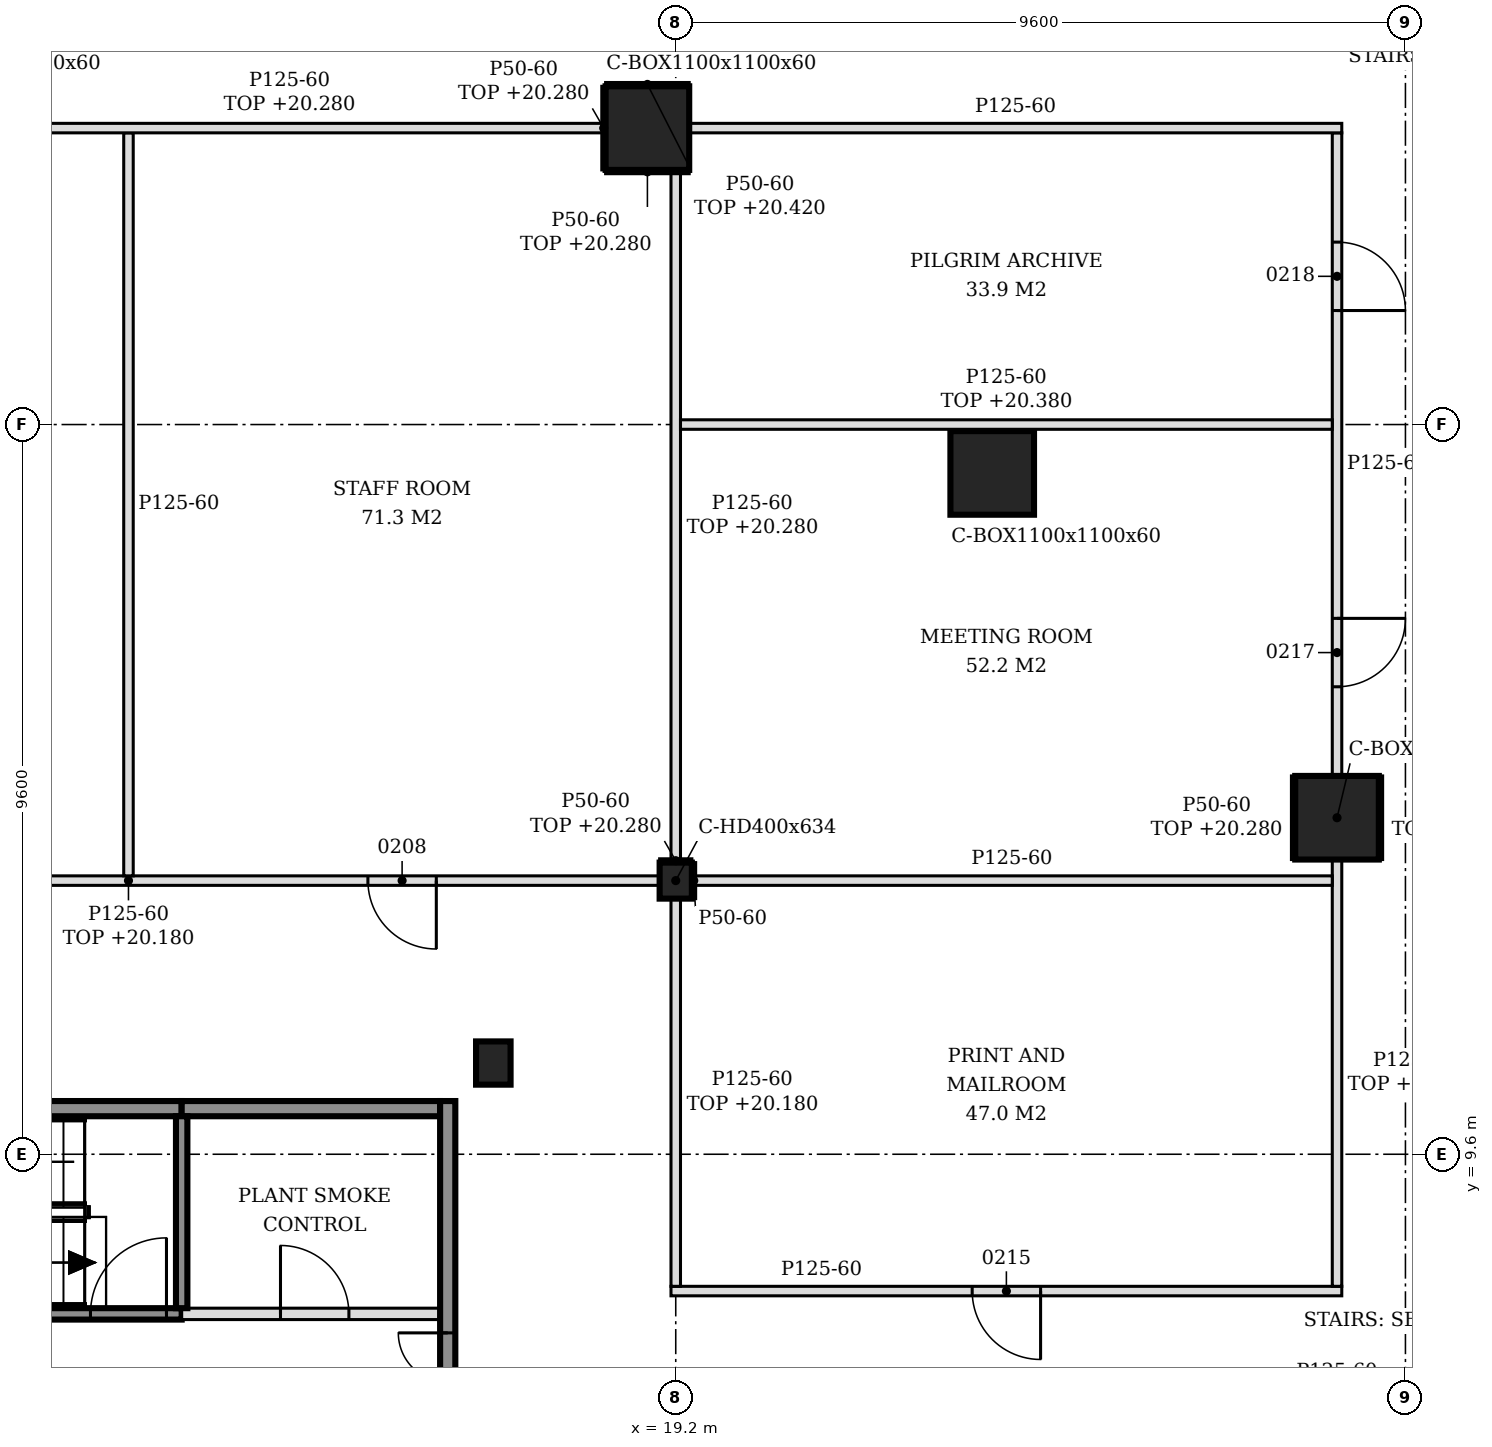
"""IFC4 building model, lengths in metres.
Left out: names, types, materials, properties, quantities, classifications, styles, units other than length and angle.
Written with IfcOpenShell. Run it as: python <this file> out.ifc"""

import sys

from ifc_helpers import new_model, si_unit, direction, frame, frame_2d, origin, origin_2d, place, context, subcontext, project, spatial, polyline, rectangle, hollow_rectangle, i_section, outline, extrude, element, fill, save


model = new_model("IFC4")
c1 = context("Model", 3, precision=1e-05, world=origin(), true_north=direction((0.0, 1.0)))
c2 = subcontext(c1, "Body", "Model", "MODEL_VIEW")
j1 = project(units=[si_unit("LENGTHUNIT", "METRE"), si_unit("PLANEANGLEUNIT", "RADIAN")], contexts=[c1])
p1 = place(None, origin())
s1 = spatial("IfcSite", under=j1, at=p1, CompositionType="ELEMENT")
p2 = place(p1, origin())
s2 = spatial("IfcBuilding", under=s1, at=p2, CompositionType="ELEMENT")
p3 = place(p2, frame((0.0, 0.0, 15.0)))
s3 = spatial("IfcBuildingStorey", under=s2, at=p3, CompositionType="ELEMENT", Elevation=15.0)
for number, where, z_axis, x_axis in (
    (1, (27.9, 14.027, -0.2), (0.0, 0.0, 1.0), (1.0, 0.0, 0.0)),
    (2, (23.364, 18.564, -0.2), (0.0, 0.0, 1.0), (1.0, 0.0, 0.0)),
    (3, (18.827, 23.1, -0.2), (0.0, 0.0, 1.0), (1.0, 0.0, 0.0)),
):
    element("IfcColumn", number, at=place(p3, frame(where, z_axis=z_axis, x_axis=x_axis)), inside=s3, PredefinedType="COLUMN", context=c2, shape_type="SweptSolid", body=[
        extrude(hollow_rectangle(XDim=1.1, YDim=1.1, WallThickness=0.06, at=origin_2d()), origin(), (0.0, 0.0, 1.0), 6.0),
    ])
p4 = place(p3, frame((19.2, 13.2, -0.2), z_axis=(0.0, 0.0, 1.0), x_axis=(1.0, 0.0, 0.0)))
e4 = element("IfcColumn", 4, at=p4, inside=s3, PredefinedType="COLUMN", context=c2, shape_type="SweptSolid", body=[
    extrude(i_section(OverallWidth=0.424, OverallDepth=0.474, WebThickness=0.048, FlangeThickness=0.077, FilletRadius=0.015, at=origin_2d()), origin(), (0.0, 0.0, 1.0), 6.0),
])
p5 = place(p3, frame((16.8, 10.8, -0.2), z_axis=(0.0, 0.0, 1.0), x_axis=(1.0, 0.0, 0.0)))
e5 = element("IfcColumn", 5, at=p5, inside=s3, PredefinedType="COLUMN", context=c2, shape_type="SweptSolid", body=[
    extrude(i_section(OverallWidth=0.454, OverallDepth=0.569, WebThickness=0.078, FlangeThickness=0.125, FilletRadius=0.015, at=origin_2d()), origin(), (0.0, 0.0, 1.0), 6.0),
])
p6 = place(p3, frame((6.275, 7.5, 0.0), z_axis=(0.0, 0.0, 1.0), x_axis=(1.0, 0.0, 0.0)))
e6 = element("IfcWall", 6, at=p6, inside=s3, PredefinedType="SOLIDWALL", context=c2, shape_type="SweptSolid", body=[
    extrude(rectangle(XDim=6.425, YDim=0.15, at=frame_2d((3.212, 0.0))), origin(), (0.0, 0.0, 1.0), 5.8),
])
p7 = place(p6, frame((5.225, 0.0, 0.0)))
e7 = element("IfcOpeningElement", 7, at=p7, cuts=e6, PredefinedType="OPENING", context=c2, shape_type="SweptSolid", body=[
    extrude(rectangle(XDim=1.0, YDim=2.1, at=frame_2d((0.5, 1.05))), frame((0.0, 0.085, 0.0), z_axis=(0.0, -1.0, 0.0), x_axis=(1.0, 0.0, 0.0)), (0.0, 0.0, 1.0), 0.17),
])
p8 = place(p3, frame((12.7, 7.5, 0.0), z_axis=(0.0, 0.0, 1.0), x_axis=(1.0, 0.0, 0.0)))
e8 = element("IfcWall", 8, at=p8, inside=s3, PredefinedType="SOLIDWALL", context=c2, shape_type="SweptSolid", body=[
    extrude(rectangle(XDim=3.4, YDim=0.15, at=frame_2d((1.7, 0.0))), origin(), (0.0, 0.0, 1.0), 5.8),
])
p9 = place(p8, frame((1.3, 0.0, 0.0)))
e9 = element("IfcOpeningElement", 9, at=p9, cuts=e8, PredefinedType="OPENING", context=c2, shape_type="SweptSolid", body=[
    extrude(rectangle(XDim=0.9, YDim=2.1, at=frame_2d((0.45, 1.05))), frame((0.0, 0.085, 0.0), z_axis=(0.0, -1.0, 0.0), x_axis=(1.0, 0.0, 0.0)), (0.0, 0.0, 1.0), 0.17),
])
p10 = place(p3, frame((6.2, 10.2, 0.0), z_axis=(0.0, 0.0, 1.0), x_axis=(1.0, 0.0, 0.0)))
e10 = element("IfcWall", 10, at=p10, inside=s3, PredefinedType="SOLIDWALL", context=c2, shape_type="SweptSolid", body=[
    extrude(rectangle(XDim=6.5, YDim=0.2, at=frame_2d((3.25, 0.0))), origin(), (0.0, 0.0, 1.0), 5.8),
])
p11 = place(p3, frame((12.7, 10.2, 0.0), z_axis=(0.0, 0.0, 1.0), x_axis=(1.0, 0.0, 0.0)))
e11 = element("IfcWall", 11, at=p11, inside=s3, PredefinedType="SOLIDWALL", context=c2, shape_type="SweptSolid", body=[
    extrude(rectangle(XDim=3.4, YDim=0.2, at=frame_2d((1.7, 0.0))), origin(), (0.0, 0.0, 1.0), 5.8),
])
p12 = place(p3, frame((12.7, 7.575, 0.0), z_axis=(0.0, 0.0, 1.0), x_axis=(0.0, 1.0, 0.0)))
e12 = element("IfcWall", 12, at=p12, inside=s3, PredefinedType="SOLIDWALL", context=c2, shape_type="SweptSolid", body=[
    extrude(rectangle(XDim=2.525, YDim=0.15, at=frame_2d((1.263, 0.0))), origin(), (0.0, 0.0, 1.0), 5.8),
])
p13 = place(p3, frame((16.2, -5.5, 0.0), z_axis=(0.0, 0.0, 1.0), x_axis=(0.0, 1.0, 0.0)))
e13 = element("IfcWall", 13, at=p13, inside=s3, PredefinedType="SOLIDWALL", context=c2, shape_type="SweptSolid", body=[
    extrude(rectangle(XDim=15.8, YDim=0.2, at=frame_2d((7.9, 0.0))), origin(), (0.0, 0.0, 1.0), 5.8),
])
p14 = place(p13, frame((3.05, 0.0, 0.0)))
e14 = element("IfcOpeningElement", 14, at=p14, cuts=e13, PredefinedType="OPENING", context=c2, shape_type="SweptSolid", body=[
    extrude(rectangle(XDim=1.3, YDim=2.1, at=frame_2d((0.65, 1.05))), frame((0.0, 0.11, 0.0), z_axis=(0.0, -1.0, 0.0), x_axis=(1.0, 0.0, 0.0)), (0.0, 0.0, 1.0), 0.22),
])
p15 = place(p13, frame((11.45, 0.0, 0.0)))
e15 = element("IfcOpeningElement", 15, at=p15, cuts=e13, PredefinedType="OPENING", context=c2, shape_type="SweptSolid", body=[
    extrude(rectangle(XDim=1.3, YDim=2.1, at=frame_2d((0.65, 1.05))), frame((0.0, 0.11, 0.0), z_axis=(0.0, -1.0, 0.0), x_axis=(1.0, 0.0, 0.0)), (0.0, 0.0, 1.0), 0.22),
])
p16 = place(p3, frame((19.137, 7.8, 0.0), z_axis=(0.0, 0.0, 1.0), x_axis=(1.0, 0.0, 0.0)))
e16 = element("IfcWall", 16, at=p16, inside=s3, PredefinedType="PARTITIONING", context=c2, shape_type="SweptSolid", body=[
    extrude(outline(polyline([(0.0, 0.0), (8.825, 0.0), (8.825, 5.28), (8.613, 5.28), (8.611, 5.8), (4.962, 5.8), (4.96, 5.28), (4.762, 5.28), (4.76, 5.8), (0.212, 5.8), (0.21, 5.18), (0.0, 5.18), (0.0, 0.0)])), frame((0.0, 0.062, 0.0), z_axis=(0.0, -1.0, 0.0), x_axis=(1.0, 0.0, 0.0)), (0.0, 0.0, 1.0), 0.125),
])
p17 = place(p16, frame((3.962, 0.0, 0.0)))
e17 = element("IfcOpeningElement", 17, at=p17, cuts=e16, PredefinedType="OPENING", context=c2, shape_type="SweptSolid", body=[
    extrude(rectangle(XDim=0.9, YDim=2.1, at=frame_2d((0.45, 1.05))), frame((0.0, 0.073, 0.0), z_axis=(0.0, -1.0, 0.0), x_axis=(1.0, 0.0, 0.0)), (0.0, 0.0, 1.0), 0.145),
])
p18 = place(p3, frame((19.2, 7.863, 0.0), z_axis=(0.0, 0.0, 1.0), x_axis=(0.0, 1.0, 0.0)))
e18 = element("IfcWall", 18, at=p18, inside=s3, PredefinedType="PARTITIONING", context=c2, shape_type="SweptSolid", body=[
    extrude(rectangle(XDim=5.1, YDim=0.125, at=frame_2d((2.55, 0.0))), origin(), (0.0, 0.0, 1.0), 5.18),
])
p19 = place(p3, frame((27.9, 7.863, 0.0), z_axis=(0.0, 0.0, 1.0), x_axis=(0.0, 1.0, 0.0)))
e19 = element("IfcWall", 19, at=p19, inside=s3, PredefinedType="PARTITIONING", context=c2, shape_type="SweptSolid", body=[
    extrude(rectangle(XDim=5.615, YDim=0.125, at=frame_2d((2.807, 0.0))), origin(), (0.0, 0.0, 1.0), 5.28),
])
p20 = place(p3, frame((7.412, 13.2, 0.0), z_axis=(0.0, 0.0, 1.0), x_axis=(1.0, 0.0, 0.0)))
e20 = element("IfcWall", 20, at=p20, inside=s3, PredefinedType="PARTITIONING", context=c2, shape_type="SweptSolid", body=[
    extrude(rectangle(XDim=11.576, YDim=0.125, at=frame_2d((5.788, 0.0))), origin(), (0.0, 0.0, 1.0), 5.18),
])
p21 = place(p20, frame((0.538, 0.0, 0.0)))
e21 = element("IfcOpeningElement", 21, at=p21, cuts=e20, PredefinedType="OPENING", context=c2, shape_type="SweptSolid", body=[
    extrude(rectangle(XDim=0.9, YDim=2.1, at=frame_2d((0.45, 1.05))), frame((0.0, 0.073, 0.0), z_axis=(0.0, -1.0, 0.0), x_axis=(1.0, 0.0, 0.0)), (0.0, 0.0, 1.0), 0.145),
])
p22 = place(p20, frame((7.738, 0.0, 0.0)))
e22 = element("IfcOpeningElement", 22, at=p22, cuts=e20, PredefinedType="OPENING", context=c2, shape_type="SweptSolid", body=[
    extrude(rectangle(XDim=0.9, YDim=2.1, at=frame_2d((0.45, 1.05))), frame((0.0, 0.073, 0.0), z_axis=(0.0, -1.0, 0.0), x_axis=(1.0, 0.0, 0.0)), (0.0, 0.0, 1.0), 0.145),
])
p23 = place(p3, frame((19.412, 13.2, 0.0), z_axis=(0.0, 0.0, 1.0), x_axis=(1.0, 0.0, 0.0)))
e23 = element("IfcWall", 23, at=p23, inside=s3, PredefinedType="PARTITIONING", context=c2, shape_type="SweptSolid", body=[
    extrude(outline(polyline([(0.0, 0.0), (8.425, 0.0), (8.426, 5.28), (8.338, 5.28), (8.336, 5.8), (4.678, 5.8), (4.676, 5.38), (4.498, 5.38), (4.496, 5.8), (0.0, 5.8), (0.0, 0.0)])), frame((0.0, 0.062, 0.0), z_axis=(0.0, -1.0, 0.0), x_axis=(1.0, 0.0, 0.0)), (0.0, 0.0, 1.0), 0.125),
])
p24 = place(p3, frame((12.0, 13.262, 0.0), z_axis=(0.0, 0.0, 1.0), x_axis=(0.0, 1.0, 0.0)))
e24 = element("IfcWall", 24, at=p24, inside=s3, PredefinedType="PARTITIONING", context=c2, shape_type="SweptSolid", body=[
    extrude(outline(polyline([(0.0, 0.0), (9.775, 0.0), (9.775, 5.28), (9.688, 5.28), (9.686, 5.8), (0.087, 5.8), (0.085, 5.18), (0.0, 5.18), (0.0, 0.0)])), frame((0.0, 0.062, 0.0), z_axis=(0.0, -1.0, 0.0), x_axis=(1.0, 0.0, 0.0)), (0.0, 0.0, 1.0), 0.125),
])
p25 = place(p3, frame((19.2, 13.437, 0.0), z_axis=(0.0, 0.0, 1.0), x_axis=(0.0, 1.0, 0.0)))
e25 = element("IfcWall", 25, at=p25, inside=s3, PredefinedType="PARTITIONING", context=c2, shape_type="SweptSolid", body=[
    extrude(rectangle(XDim=9.113, YDim=0.125, at=frame_2d((4.557, 0.0))), origin(), (0.0, 0.0, 1.0), 5.28),
])
p26 = place(p3, frame((27.9, 14.577, 0.0), z_axis=(0.0, 0.0, 1.0), x_axis=(0.0, 1.0, 0.0)))
e26 = element("IfcWall", 26, at=p26, inside=s3, PredefinedType="PARTITIONING", context=c2, shape_type="SweptSolid", body=[
    extrude(outline(polyline([(0.0, 0.0), (8.46, 0.0), (8.46, 5.8), (4.713, 5.8), (4.711, 5.38), (4.533, 5.38), (4.531, 5.8), (0.0, 5.8), (0.0, 0.0)])), frame((0.0, 0.062, 0.0), z_axis=(0.0, -1.0, 0.0), x_axis=(1.0, 0.0, 0.0)), (0.0, 0.0, 1.0), 0.125),
])
p27 = place(p26, frame((1.173, 0.0, 0.0)))
e27 = element("IfcOpeningElement", 27, at=p27, cuts=e26, PredefinedType="OPENING", context=c2, shape_type="SweptSolid", body=[
    extrude(rectangle(XDim=0.9, YDim=2.1, at=frame_2d((0.45, 1.05))), frame((0.0, 0.073, 0.0), z_axis=(0.0, -1.0, 0.0), x_axis=(1.0, 0.0, 0.0)), (0.0, 0.0, 1.0), 0.145),
])
p28 = place(p26, frame((6.123, 0.0, 0.0)))
e28 = element("IfcOpeningElement", 28, at=p28, cuts=e26, PredefinedType="OPENING", context=c2, shape_type="SweptSolid", body=[
    extrude(rectangle(XDim=0.9, YDim=2.1, at=frame_2d((0.45, 1.05))), frame((0.0, 0.073, 0.0), z_axis=(0.0, -1.0, 0.0), x_axis=(1.0, 0.0, 0.0)), (0.0, 0.0, 1.0), 0.145),
])
p29 = place(p3, frame((19.262, 19.2, 0.0), z_axis=(0.0, 0.0, 1.0), x_axis=(1.0, 0.0, 0.0)))
e29 = element("IfcWall", 29, at=p29, inside=s3, PredefinedType="PARTITIONING", context=c2, shape_type="SweptSolid", body=[
    extrude(outline(polyline([(0.0, 0.0), (8.575, 0.0), (8.575, 5.38), (3.739, 5.38), (3.737, 5.28), (3.19, 5.28), (3.188, 5.38), (0.038, 5.38), (0.035, 5.28), (0.0, 5.28), (0.0, 0.0)])), frame((0.0, 0.062, 0.0), z_axis=(0.0, -1.0, 0.0), x_axis=(1.0, 0.0, 0.0)), (0.0, 0.0, 1.0), 0.125),
])
p30 = place(p3, frame((9.964, 23.1, 0.0), z_axis=(0.0, 0.0, 1.0), x_axis=(1.0, 0.0, 0.0)))
e30 = element("IfcWall", 30, at=p30, inside=s3, PredefinedType="PARTITIONING", context=c2, shape_type="SweptSolid", body=[
    extrude(rectangle(XDim=8.313, YDim=0.125, at=frame_2d((4.157, 0.0))), origin(), (0.0, 0.0, 1.0), 5.28),
])
p31 = place(p3, frame((19.377, 23.1, 0.0), z_axis=(0.0, 0.0, 1.0), x_axis=(1.0, 0.0, 0.0)))
e31 = element("IfcWall", 31, at=p31, inside=s3, PredefinedType="PARTITIONING", context=c2, shape_type="SweptSolid", body=[
    extrude(rectangle(XDim=8.585, YDim=0.125, at=frame_2d((4.292, 0.0))), origin(), (0.0, 0.0, 1.0), 5.8),
])
p32 = place(p3, frame((19.437, 12.963, 0.0), z_axis=(0.0, 0.0, 1.0), x_axis=(0.0, 1.0, 0.0)))
e32 = element("IfcWall", 32, at=p32, inside=s3, PredefinedType="PARTITIONING", context=c2, shape_type="SweptSolid", body=[
    extrude(rectangle(XDim=0.474, YDim=0.05, at=frame_2d((0.237, 0.0))), origin(), (0.0, 0.0, 1.0), 5.8),
])
for number, where, z_axis, x_axis in (
    (33, (27.325, 13.477, 0.0), (0.0, 0.0, 1.0), (0.0, 1.0, 0.0)),
    (34, (28.475, 13.477, 0.0), (0.0, 0.0, 1.0), (0.0, 1.0, 0.0)),
):
    element("IfcWall", number, at=place(p3, frame(where, z_axis=z_axis, x_axis=x_axis)), inside=s3, PredefinedType="PARTITIONING", context=c2, shape_type="SweptSolid", body=[
        extrude(rectangle(XDim=1.1, YDim=0.05, at=frame_2d((0.55, 0.0))), origin(), (0.0, 0.0, 1.0), 5.28),
    ])
p33 = place(p3, frame((18.988, 13.462, 0.0), z_axis=(0.0, 0.0, 1.0), x_axis=(1.0, 0.0, 0.0)))
e35 = element("IfcWall", 35, at=p33, inside=s3, PredefinedType="PARTITIONING", context=c2, shape_type="SweptSolid", body=[
    extrude(rectangle(XDim=0.424, YDim=0.05, at=frame_2d((0.212, 0.0))), origin(), (0.0, 0.0, 1.0), 5.28),
])
p34 = place(p3, frame((18.252, 22.55, 0.0), z_axis=(0.0, 0.0, 1.0), x_axis=(0.0, 1.0, 0.0)))
e36 = element("IfcWall", 36, at=p34, inside=s3, PredefinedType="PARTITIONING", context=c2, shape_type="SweptSolid", body=[
    extrude(rectangle(XDim=1.1, YDim=0.05, at=frame_2d((0.55, 0.0))), origin(), (0.0, 0.0, 1.0), 5.28),
])
p35 = place(p3, frame((18.277, 22.525, 0.0), z_axis=(0.0, 0.0, 1.0), x_axis=(1.0, 0.0, 0.0)))
e37 = element("IfcWall", 37, at=p35, inside=s3, PredefinedType="PARTITIONING", context=c2, shape_type="SweptSolid", body=[
    extrude(rectangle(XDim=1.1, YDim=0.05, at=frame_2d((0.55, 0.0))), origin(), (0.0, 0.0, 1.0), 5.28),
])
p36 = place(p3, frame((18.277, 23.675, 0.0), z_axis=(0.0, 0.0, 1.0), x_axis=(1.0, 0.0, 0.0)))
e38 = element("IfcWall", 38, at=p36, inside=s3, PredefinedType="PARTITIONING", context=c2, shape_type="SweptSolid", body=[
    extrude(rectangle(XDim=1.1, YDim=0.05, at=frame_2d((0.55, 0.0))), origin(), (0.0, 0.0, 1.0), 5.42),
])
p37 = place(p7, origin())
e39 = element("IfcDoor", 39, at=p37, inside=s3, OperationType="SINGLE_SWING_RIGHT", PredefinedType="DOOR", context=c2, shape_type="SweptSolid", body=[
    extrude(rectangle(XDim=1.0, YDim=2.1, at=frame_2d((0.5, 1.05))), frame((0.0, 0.025, 0.0), z_axis=(0.0, -1.0, 0.0), x_axis=(1.0, 0.0, 0.0)), (0.0, 0.0, 1.0), 0.05),
])
fill(e7, e39)
p38 = place(p15, origin())
e40 = element("IfcDoor", 40, at=p38, inside=s3, OperationType="DOUBLE_DOOR_SINGLE_SWING", PredefinedType="DOOR", context=c2, shape_type="SweptSolid", body=[
    extrude(rectangle(XDim=1.3, YDim=2.1, at=frame_2d((0.65, 1.05))), frame((0.0, 0.025, 0.0), z_axis=(0.0, -1.0, 0.0), x_axis=(1.0, 0.0, 0.0)), (0.0, 0.0, 1.0), 0.05),
])
fill(e15, e40)
p39 = place(p9, origin())
e41 = element("IfcDoor", 41, at=p39, inside=s3, OperationType="SINGLE_SWING_LEFT", PredefinedType="DOOR", context=c2, shape_type="SweptSolid", body=[
    extrude(rectangle(XDim=0.9, YDim=2.1, at=frame_2d((0.45, 1.05))), frame((0.0, 0.025, 0.0), z_axis=(0.0, -1.0, 0.0), x_axis=(1.0, 0.0, 0.0)), (0.0, 0.0, 1.0), 0.05),
])
fill(e9, e41)
p40 = place(p22, frame((0.9, 0.0, 0.0), z_axis=(0.0, 0.0, 1.0), x_axis=(-1.0, 0.0, 0.0)))
e42 = element("IfcDoor", 42, at=p40, inside=s3, OperationType="SINGLE_SWING_LEFT", PredefinedType="DOOR", context=c2, shape_type="SweptSolid", body=[
    extrude(rectangle(XDim=0.9, YDim=2.1, at=frame_2d((0.45, 1.05))), frame((0.0, 0.025, 0.0), z_axis=(0.0, -1.0, 0.0), x_axis=(1.0, 0.0, 0.0)), (0.0, 0.0, 1.0), 0.05),
])
fill(e22, e42)
p41 = place(p17, frame((0.9, 0.0, 0.0), z_axis=(0.0, 0.0, 1.0), x_axis=(-1.0, 0.0, 0.0)))
e43 = element("IfcDoor", 43, at=p41, inside=s3, OperationType="SINGLE_SWING_LEFT", PredefinedType="DOOR", context=c2, shape_type="SweptSolid", body=[
    extrude(rectangle(XDim=0.9, YDim=2.1, at=frame_2d((0.45, 1.05))), frame((0.0, 0.025, 0.0), z_axis=(0.0, -1.0, 0.0), x_axis=(1.0, 0.0, 0.0)), (0.0, 0.0, 1.0), 0.05),
])
fill(e17, e43)
p42 = place(p27, frame((0.9, 0.0, 0.0), z_axis=(0.0, 0.0, 1.0), x_axis=(-1.0, 0.0, 0.0)))
e44 = element("IfcDoor", 44, at=p42, inside=s3, OperationType="SINGLE_SWING_LEFT", PredefinedType="DOOR", context=c2, shape_type="SweptSolid", body=[
    extrude(rectangle(XDim=0.9, YDim=2.1, at=frame_2d((0.45, 1.05))), frame((0.0, 0.025, 0.0), z_axis=(0.0, -1.0, 0.0), x_axis=(1.0, 0.0, 0.0)), (0.0, 0.0, 1.0), 0.05),
])
fill(e27, e44)
p43 = place(p28, frame((0.9, 0.0, 0.0), z_axis=(0.0, 0.0, 1.0), x_axis=(-1.0, 0.0, 0.0)))
e45 = element("IfcDoor", 45, at=p43, inside=s3, OperationType="SINGLE_SWING_RIGHT", PredefinedType="DOOR", context=c2, shape_type="SweptSolid", body=[
    extrude(rectangle(XDim=0.9, YDim=2.1, at=frame_2d((0.45, 1.05))), frame((0.0, 0.025, 0.0), z_axis=(0.0, -1.0, 0.0), x_axis=(1.0, 0.0, 0.0)), (0.0, 0.0, 1.0), 0.05),
])
fill(e28, e45)
save(model, sys.argv[1])
